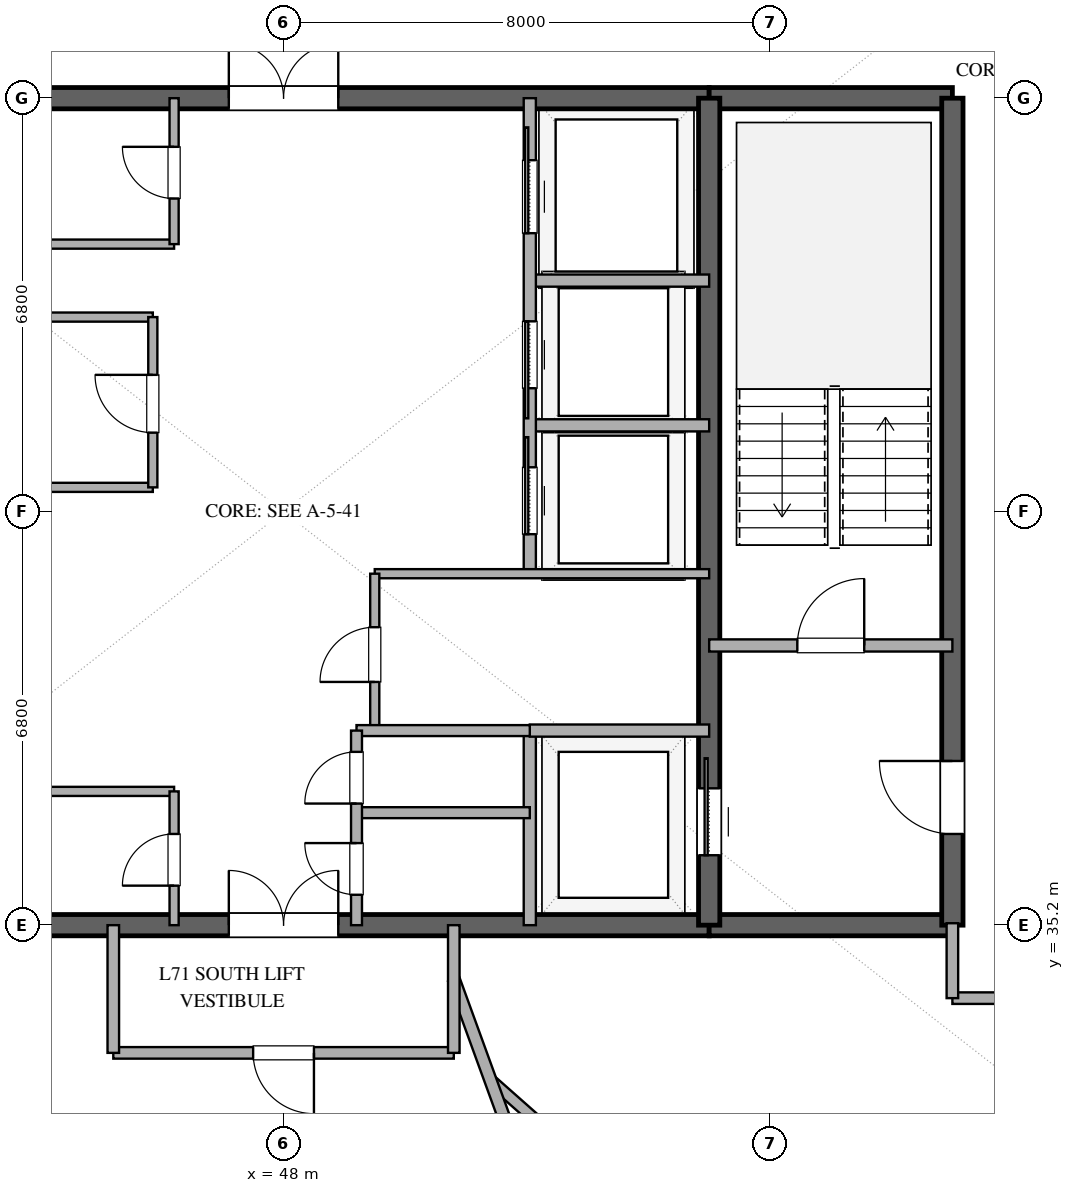
"""IFC4 building model, lengths in metres.
Left out: names, types, materials, properties, quantities, classifications, styles, units other than length and angle.
Written with IfcOpenShell. Run it as: python <this file> out.ifc"""

import sys

from ifc_helpers import new_model, si_unit, direction, frame, frame_2d, origin, place, context, subcontext, project, spatial, rectangle, extrude, element, fill, save


model = new_model("IFC4")
c1 = context("Model", 3, precision=1e-05, world=origin(), true_north=direction((0.0, 1.0)))
c2 = subcontext(c1, "Body", "Model", "MODEL_VIEW")
j1 = project(units=[si_unit("LENGTHUNIT", "METRE"), si_unit("PLANEANGLEUNIT", "RADIAN")], contexts=[c1])
p1 = place(None, origin())
s1 = spatial("IfcSite", under=j1, at=p1, CompositionType="ELEMENT")
p2 = place(p1, origin())
s2 = spatial("IfcBuilding", under=s1, at=p2, CompositionType="ELEMENT")
p3 = place(p2, frame((0.0, 0.0, 276.6)))
s3 = spatial("IfcBuildingStorey", under=s2, at=p3, CompositionType="ELEMENT", Elevation=276.6)
p4 = place(p3, frame((41.0, 35.2, 0.0), z_axis=(0.0, 0.0, 1.0), x_axis=(1.0, 0.0, 0.0)))
e1 = element("IfcWall", 1, at=p4, inside=s3, PredefinedType="SHEAR", context=c2, shape_type="SweptSolid", body=[
    extrude(rectangle(XDim=14.0, YDim=0.35, at=frame_2d((7.0, 0.0))), origin(), (0.0, 0.0, 1.0), 3.37),
])
p5 = place(p4, frame((6.1, 0.0, 0.0)))
e2 = element("IfcOpeningElement", 2, at=p5, cuts=e1, PredefinedType="OPENING", context=c2, shape_type="SweptSolid", body=[
    extrude(rectangle(XDim=1.8, YDim=2.25, at=frame_2d((0.9, 1.125))), frame((0.0, 0.185, 0.0), z_axis=(0.0, -1.0, 0.0), x_axis=(1.0, 0.0, 0.0)), (0.0, 0.0, 1.0), 0.37),
])
p6 = place(p3, frame((55.0, 35.2, 0.0), z_axis=(0.0, 0.0, 1.0), x_axis=(1.0, 0.0, 0.0)))
e3 = element("IfcWall", 3, at=p6, inside=s3, PredefinedType="SHEAR", context=c2, shape_type="SweptSolid", body=[
    extrude(rectangle(XDim=4.0, YDim=0.35, at=frame_2d((2.0, 0.0))), origin(), (0.0, 0.0, 1.0), 3.37),
])
p7 = place(p3, frame((41.0, 48.8, 0.0), z_axis=(0.0, 0.0, 1.0), x_axis=(1.0, 0.0, 0.0)))
e4 = element("IfcWall", 4, at=p7, inside=s3, PredefinedType="SHEAR", context=c2, shape_type="SweptSolid", body=[
    extrude(rectangle(XDim=14.0, YDim=0.35, at=frame_2d((7.0, 0.0))), origin(), (0.0, 0.0, 1.0), 3.37),
])
p8 = place(p7, frame((6.1, 0.0, 0.0)))
e5 = element("IfcOpeningElement", 5, at=p8, cuts=e4, PredefinedType="OPENING", context=c2, shape_type="SweptSolid", body=[
    extrude(rectangle(XDim=1.8, YDim=2.25, at=frame_2d((0.9, 1.125))), frame((0.0, 0.185, 0.0), z_axis=(0.0, -1.0, 0.0), x_axis=(1.0, 0.0, 0.0)), (0.0, 0.0, 1.0), 0.37),
])
p9 = place(p3, frame((55.0, 48.8, 0.0), z_axis=(0.0, 0.0, 1.0), x_axis=(1.0, 0.0, 0.0)))
e6 = element("IfcWall", 6, at=p9, inside=s3, PredefinedType="SHEAR", context=c2, shape_type="SweptSolid", body=[
    extrude(rectangle(XDim=4.0, YDim=0.35, at=frame_2d((2.0, 0.0))), origin(), (0.0, 0.0, 1.0), 3.37),
])
p10 = place(p3, frame((59.0, 35.2, 0.0), z_axis=(0.0, 0.0, 1.0), x_axis=(0.0, 1.0, 0.0)))
e7 = element("IfcWall", 7, at=p10, inside=s3, PredefinedType="SHEAR", context=c2, shape_type="SweptSolid", body=[
    extrude(rectangle(XDim=13.6, YDim=0.35, at=frame_2d((6.8, 0.0))), origin(), (0.0, 0.0, 1.0), 3.37),
])
p11 = place(p10, frame((1.5, 0.0, 0.0)))
e8 = element("IfcOpeningElement", 8, at=p11, cuts=e7, PredefinedType="OPENING", context=c2, shape_type="SweptSolid", body=[
    extrude(rectangle(XDim=1.2, YDim=2.15, at=frame_2d((0.6, 1.075))), frame((0.0, 0.185, 0.0), z_axis=(0.0, -1.0, 0.0), x_axis=(1.0, 0.0, 0.0)), (0.0, 0.0, 1.0), 0.37),
])
p12 = place(p3, frame((55.0, 35.2, 0.0), z_axis=(0.0, 0.0, 1.0), x_axis=(0.0, 1.0, 0.0)))
e9 = element("IfcWall", 9, at=p12, inside=s3, PredefinedType="SHEAR", context=c2, shape_type="SweptSolid", body=[
    extrude(rectangle(XDim=13.6, YDim=0.35, at=frame_2d((6.8, 0.0))), origin(), (0.0, 0.0, 1.0), 3.37),
])
p13 = place(p12, frame((1.15, 0.0, 0.0)))
e10 = element("IfcOpeningElement", 10, at=p13, cuts=e9, PredefinedType="OPENING", context=c2, shape_type="SweptSolid", body=[
    extrude(rectangle(XDim=1.1, YDim=2.2, at=frame_2d((0.55, 1.1))), frame((0.0, 0.185, 0.0), z_axis=(0.0, -1.0, 0.0), x_axis=(1.0, 0.0, 0.0)), (0.0, 0.0, 1.0), 0.37),
])
p14 = place(p3, frame((55.0, 39.8, 0.0), z_axis=(0.0, 0.0, 1.0), x_axis=(1.0, 0.0, 0.0)))
e11 = element("IfcWall", 11, at=p14, inside=s3, PredefinedType="SOLIDWALL", context=c2, shape_type="SweptSolid", body=[
    extrude(rectangle(XDim=4.0, YDim=0.2, at=frame_2d((2.0, 0.0))), origin(), (0.0, 0.0, 1.0), 2.73),
])
p15 = place(p14, frame((1.45, 0.0, 0.0)))
e12 = element("IfcOpeningElement", 12, at=p15, cuts=e11, PredefinedType="OPENING", context=c2, shape_type="SweptSolid", body=[
    extrude(rectangle(XDim=1.1, YDim=2.15, at=frame_2d((0.55, 1.075))), frame((0.0, 0.11, 0.0), z_axis=(0.0, -1.0, 0.0), x_axis=(1.0, 0.0, 0.0)), (0.0, 0.0, 1.0), 0.22),
])
p16 = place(p3, frame((52.05, 35.2, 0.0), z_axis=(0.0, 0.0, 1.0), x_axis=(0.0, 1.0, 0.0)))
e13 = element("IfcWall", 13, at=p16, inside=s3, PredefinedType="SOLIDWALL", context=c2, shape_type="SweptSolid", body=[
    extrude(rectangle(XDim=3.2, YDim=0.2, at=frame_2d((1.6, 0.0))), origin(), (0.0, 0.0, 1.0), 2.73),
])
p17 = place(p3, frame((52.05, 38.4, 0.0), z_axis=(0.0, 0.0, 1.0), x_axis=(1.0, 0.0, 0.0)))
e14 = element("IfcWall", 14, at=p17, inside=s3, PredefinedType="SOLIDWALL", context=c2, shape_type="SweptSolid", body=[
    extrude(rectangle(XDim=2.95, YDim=0.2, at=frame_2d((1.475, 0.0))), origin(), (0.0, 0.0, 1.0), 2.73),
])
for number, where, z_axis, x_axis in (
    (15, (41.0, 42.4, 0.0), (0.0, 0.0, 1.0), (1.0, 0.0, 0.0)),
    (16, (41.0, 45.2, 0.0), (0.0, 0.0, 1.0), (1.0, 0.0, 0.0)),
):
    element("IfcWall", number, at=place(p3, frame(where, z_axis=z_axis, x_axis=x_axis)), inside=s3, PredefinedType="PARTITIONING", context=c2, shape_type="SweptSolid", body=[
        extrude(rectangle(XDim=4.85, YDim=0.15, at=frame_2d((2.425, 0.0))), origin(), (0.0, 0.0, 1.0), 2.73),
    ])
p18 = place(p3, frame((45.85, 42.4, 0.0), z_axis=(0.0, 0.0, 1.0), x_axis=(0.0, 1.0, 0.0)))
e17 = element("IfcWall", 17, at=p18, inside=s3, PredefinedType="PARTITIONING", context=c2, shape_type="SweptSolid", body=[
    extrude(rectangle(XDim=2.8, YDim=0.15, at=frame_2d((1.4, 0.0))), origin(), (0.0, 0.0, 1.0), 2.73),
])
p19 = place(p18, frame((0.9, 0.0, 0.0)))
e18 = element("IfcOpeningElement", 18, at=p19, cuts=e17, PredefinedType="OPENING", context=c2, shape_type="SweptSolid", body=[
    extrude(rectangle(XDim=0.95, YDim=2.15, at=frame_2d((0.475, 1.075))), frame((0.0, 0.085, 0.0), z_axis=(0.0, -1.0, 0.0), x_axis=(1.0, 0.0, 0.0)), (0.0, 0.0, 1.0), 0.17),
])
for number, where, z_axis, x_axis in (
    (19, (52.05, 43.42, 0.0), (0.0, 0.0, 1.0), (1.0, 0.0, 0.0)),
    (20, (52.05, 45.8, 0.0), (0.0, 0.0, 1.0), (1.0, 0.0, 0.0)),
):
    element("IfcWall", number, at=place(p3, frame(where, z_axis=z_axis, x_axis=x_axis)), inside=s3, PredefinedType="SOLIDWALL", context=c2, shape_type="SweptSolid", body=[
        extrude(rectangle(XDim=2.95, YDim=0.2, at=frame_2d((1.475, 0.0))), origin(), (0.0, 0.0, 1.0), 2.73),
    ])
p20 = place(p3, frame((52.05, 40.98, 0.0), z_axis=(0.0, 0.0, 1.0), x_axis=(0.0, 1.0, 0.0)))
e21 = element("IfcWall", 21, at=p20, inside=s3, PredefinedType="SOLIDWALL", context=c2, shape_type="SweptSolid", body=[
    extrude(rectangle(XDim=7.82, YDim=0.2, at=frame_2d((3.91, 0.0))), origin(), (0.0, 0.0, 1.0), 2.73),
])
p21 = place(p20, frame((0.65, 0.0, 0.0)))
e22 = element("IfcOpeningElement", 22, at=p21, cuts=e21, PredefinedType="OPENING", context=c2, shape_type="SweptSolid", body=[
    extrude(rectangle(XDim=1.1, YDim=2.2, at=frame_2d((0.55, 1.1))), frame((0.0, 0.11, 0.0), z_axis=(0.0, -1.0, 0.0), x_axis=(1.0, 0.0, 0.0)), (0.0, 0.0, 1.0), 0.22),
])
p22 = place(p20, frame((3.05, 0.0, 0.0)))
e23 = element("IfcOpeningElement", 23, at=p22, cuts=e21, PredefinedType="OPENING", context=c2, shape_type="SweptSolid", body=[
    extrude(rectangle(XDim=1.1, YDim=2.2, at=frame_2d((0.55, 1.1))), frame((0.0, 0.11, 0.0), z_axis=(0.0, -1.0, 0.0), x_axis=(1.0, 0.0, 0.0)), (0.0, 0.0, 1.0), 0.22),
])
p23 = place(p20, frame((5.6, 0.0, 0.0)))
e24 = element("IfcOpeningElement", 24, at=p23, cuts=e21, PredefinedType="OPENING", context=c2, shape_type="SweptSolid", body=[
    extrude(rectangle(XDim=1.2, YDim=2.2, at=frame_2d((0.6, 1.1))), frame((0.0, 0.11, 0.0), z_axis=(0.0, -1.0, 0.0), x_axis=(1.0, 0.0, 0.0)), (0.0, 0.0, 1.0), 0.22),
])
p24 = place(p3, frame((49.5, 40.98, 0.0), z_axis=(0.0, 0.0, 1.0), x_axis=(1.0, 0.0, 0.0)))
e25 = element("IfcWall", 25, at=p24, inside=s3, PredefinedType="PARTITIONING", context=c2, shape_type="SweptSolid", body=[
    extrude(rectangle(XDim=5.5, YDim=0.15, at=frame_2d((2.75, 0.0))), origin(), (0.0, 0.0, 1.0), 2.73),
])
p25 = place(p3, frame((49.5, 38.4, 0.0), z_axis=(0.0, 0.0, 1.0), x_axis=(0.0, 1.0, 0.0)))
e26 = element("IfcWall", 26, at=p25, inside=s3, PredefinedType="PARTITIONING", context=c2, shape_type="SweptSolid", body=[
    extrude(rectangle(XDim=2.58, YDim=0.15, at=frame_2d((1.29, 0.0))), origin(), (0.0, 0.0, 1.0), 2.73),
])
p26 = place(p25, frame((0.8, 0.0, 0.0)))
e27 = element("IfcOpeningElement", 27, at=p26, cuts=e26, PredefinedType="OPENING", context=c2, shape_type="SweptSolid", body=[
    extrude(rectangle(XDim=0.9, YDim=2.15, at=frame_2d((0.45, 1.075))), frame((0.0, 0.085, 0.0), z_axis=(0.0, -1.0, 0.0), x_axis=(1.0, 0.0, 0.0)), (0.0, 0.0, 1.0), 0.17),
])
p27 = place(p3, frame((43.95, 37.4, 0.0), z_axis=(0.0, 0.0, 1.0), x_axis=(1.0, 0.0, 0.0)))
e28 = element("IfcWall", 28, at=p27, inside=s3, PredefinedType="PARTITIONING", context=c2, shape_type="SweptSolid", body=[
    extrude(rectangle(XDim=2.25, YDim=0.15, at=frame_2d((1.125, 0.0))), origin(), (0.0, 0.0, 1.0), 2.73),
])
p28 = place(p3, frame((46.2, 35.2, 0.0), z_axis=(0.0, 0.0, 1.0), x_axis=(0.0, 1.0, 0.0)))
e29 = element("IfcWall", 29, at=p28, inside=s3, PredefinedType="PARTITIONING", context=c2, shape_type="SweptSolid", body=[
    extrude(rectangle(XDim=2.2, YDim=0.15, at=frame_2d((1.1, 0.0))), origin(), (0.0, 0.0, 1.0), 2.73),
])
p29 = place(p28, frame((0.65, 0.0, 0.0)))
e30 = element("IfcOpeningElement", 30, at=p29, cuts=e29, PredefinedType="OPENING", context=c2, shape_type="SweptSolid", body=[
    extrude(rectangle(XDim=0.85, YDim=2.15, at=frame_2d((0.425, 1.075))), frame((0.0, 0.085, 0.0), z_axis=(0.0, -1.0, 0.0), x_axis=(1.0, 0.0, 0.0)), (0.0, 0.0, 1.0), 0.17),
])
p30 = place(p3, frame((43.95, 46.4, 0.0), z_axis=(0.0, 0.0, 1.0), x_axis=(1.0, 0.0, 0.0)))
e31 = element("IfcWall", 31, at=p30, inside=s3, PredefinedType="PARTITIONING", context=c2, shape_type="SweptSolid", body=[
    extrude(rectangle(XDim=2.25, YDim=0.15, at=frame_2d((1.125, 0.0))), origin(), (0.0, 0.0, 1.0), 2.73),
])
p31 = place(p3, frame((46.2, 46.4, 0.0), z_axis=(0.0, 0.0, 1.0), x_axis=(0.0, 1.0, 0.0)))
e32 = element("IfcWall", 32, at=p31, inside=s3, PredefinedType="PARTITIONING", context=c2, shape_type="SweptSolid", body=[
    extrude(rectangle(XDim=2.4, YDim=0.15, at=frame_2d((1.2, 0.0))), origin(), (0.0, 0.0, 1.0), 2.73),
])
p32 = place(p31, frame((0.75, 0.0, 0.0)))
e33 = element("IfcOpeningElement", 33, at=p32, cuts=e32, PredefinedType="OPENING", context=c2, shape_type="SweptSolid", body=[
    extrude(rectangle(XDim=0.85, YDim=2.15, at=frame_2d((0.425, 1.075))), frame((0.0, 0.085, 0.0), z_axis=(0.0, -1.0, 0.0), x_axis=(1.0, 0.0, 0.0)), (0.0, 0.0, 1.0), 0.17),
])
for number, where, z_axis, x_axis in (
    (34, (49.2, 37.05, 0.0), (0.0, 0.0, 1.0), (1.0, 0.0, 0.0)),
    (35, (49.2, 38.4, 0.0), (0.0, 0.0, 1.0), (1.0, 0.0, 0.0)),
):
    element("IfcWall", number, at=place(p3, frame(where, z_axis=z_axis, x_axis=x_axis)), inside=s3, PredefinedType="PLUMBINGWALL", context=c2, shape_type="SweptSolid", body=[
        extrude(rectangle(XDim=2.85, YDim=0.18, at=frame_2d((1.425, 0.0))), origin(), (0.0, 0.0, 1.0), 2.73),
    ])
p33 = place(p3, frame((49.2, 35.2, 0.0), z_axis=(0.0, 0.0, 1.0), x_axis=(0.0, 1.0, 0.0)))
e36 = element("IfcWall", 36, at=p33, inside=s3, PredefinedType="PLUMBINGWALL", context=c2, shape_type="SweptSolid", body=[
    extrude(rectangle(XDim=3.2, YDim=0.18, at=frame_2d((1.6, 0.0))), origin(), (0.0, 0.0, 1.0), 2.73),
])
p34 = place(p33, frame((0.5, 0.0, 0.0)))
e37 = element("IfcOpeningElement", 37, at=p34, cuts=e36, PredefinedType="OPENING", context=c2, shape_type="SweptSolid", body=[
    extrude(rectangle(XDim=0.85, YDim=2.1, at=frame_2d((0.425, 1.05))), frame((0.0, 0.1, 0.0), z_axis=(0.0, -1.0, 0.0), x_axis=(1.0, 0.0, 0.0)), (0.0, 0.0, 1.0), 0.2),
])
p35 = place(p33, frame((2.0, 0.0, 0.0)))
e38 = element("IfcOpeningElement", 38, at=p35, cuts=e36, PredefinedType="OPENING", context=c2, shape_type="SweptSolid", body=[
    extrude(rectangle(XDim=0.85, YDim=2.15, at=frame_2d((0.425, 1.075))), frame((0.0, 0.1, 0.0), z_axis=(0.0, -1.0, 0.0), x_axis=(1.0, 0.0, 0.0)), (0.0, 0.0, 1.0), 0.2),
])
p36 = place(p3, frame((56.389, 28.246, 0.0), z_axis=(0.0, 0.0, 1.0), x_axis=(-0.749087509224, 0.662471058632, 0.0)))
e39 = element("IfcWall", 39, at=p36, inside=s3, PredefinedType="PLUMBINGWALL", context=c2, shape_type="SweptSolid", body=[
    extrude(rectangle(XDim=6.66, YDim=0.18, at=frame_2d((3.33, 0.0))), origin(), (0.0, 0.0, 1.0), 2.73),
])
p37 = place(p36, frame((2.905, 0.0, 0.0)))
e40 = element("IfcOpeningElement", 40, at=p37, cuts=e39, PredefinedType="OPENING", context=c2, shape_type="SweptSolid", body=[
    extrude(rectangle(XDim=0.85, YDim=2.1, at=frame_2d((0.425, 1.05))), frame((0.0, 0.1, 0.0), z_axis=(0.0, -1.0, 0.0), x_axis=(1.0, 0.0, 0.0)), (0.0, 0.0, 1.0), 0.2),
])
p38 = place(p3, frame((50.8, 33.1, 0.0), z_axis=(0.0, 0.0, 1.0), x_axis=(-1.0, 0.0, 0.0)))
e41 = element("IfcWall", 41, at=p38, inside=s3, PredefinedType="PARTITIONING", context=c2, shape_type="SweptSolid", body=[
    extrude(rectangle(XDim=5.6, YDim=0.19, at=frame_2d((2.8, 0.0))), origin(), (0.0, 0.0, 1.0), 2.73),
])
p39 = place(p38, frame((2.3, 0.0, 0.0)))
e42 = element("IfcOpeningElement", 42, at=p39, cuts=e41, PredefinedType="OPENING", context=c2, shape_type="SweptSolid", body=[
    extrude(rectangle(XDim=1.0, YDim=2.2, at=frame_2d((0.5, 1.1))), frame((0.0, 0.105, 0.0), z_axis=(0.0, -1.0, 0.0), x_axis=(1.0, 0.0, 0.0)), (0.0, 0.0, 1.0), 0.21),
])
p40 = place(p3, frame((50.8, 34.307, 0.0), z_axis=(0.0, 0.0, 1.0), x_axis=(0.342010724278, -0.939696048985, 0.0)))
e43 = element("IfcWall", 43, at=p40, inside=s3, PredefinedType="PARTITIONING", context=c2, shape_type="SweptSolid", body=[
    extrude(rectangle(XDim=8.568, YDim=0.2, at=frame_2d((4.284, 0.0))), origin(), (0.0, 0.0, 1.0), 2.73),
])
p41 = place(p3, frame((61.2, 34.0, 0.0), z_axis=(0.0, 0.0, 1.0), x_axis=(-1.0, 0.0, 0.0)))
e44 = element("IfcWall", 44, at=p41, inside=s3, PredefinedType="PARTITIONING", context=c2, shape_type="SweptSolid", body=[
    extrude(rectangle(XDim=2.2, YDim=0.19, at=frame_2d((1.1, 0.0))), origin(), (0.0, 0.0, 1.0), 2.73),
])
for number, where, z_axis, x_axis in (
    (45, (45.2, 33.1, 0.0), (0.0, 0.0, 1.0), (0.0, 1.0, 0.0)),
    (46, (50.8, 35.2, 0.0), (0.0, 0.0, 1.0), (0.0, -1.0, 0.0)),
):
    element("IfcWall", number, at=place(p3, frame(where, z_axis=z_axis, x_axis=x_axis)), inside=s3, PredefinedType="PARTITIONING", context=c2, shape_type="SweptSolid", body=[
        extrude(rectangle(XDim=2.1, YDim=0.19, at=frame_2d((1.05, 0.0))), origin(), (0.0, 0.0, 1.0), 2.73),
    ])
p42 = place(p3, frame((59.0, 34.0, 0.0), z_axis=(0.0, 0.0, 1.0), x_axis=(0.0, 1.0, 0.0)))
e47 = element("IfcWall", 47, at=p42, inside=s3, PredefinedType="PARTITIONING", context=c2, shape_type="SweptSolid", body=[
    extrude(rectangle(XDim=1.232, YDim=0.19, at=frame_2d((0.616, 0.0))), origin(), (0.0, 0.0, 1.0), 2.73),
])
p43 = place(p13, origin())
e48 = element("IfcDoor", 48, at=p43, inside=s3, OperationType="SLIDING_TO_RIGHT", PredefinedType="DOOR", context=c2, shape_type="SweptSolid", body=[
    extrude(rectangle(XDim=1.1, YDim=2.2, at=frame_2d((0.55, 1.1))), frame((0.0, 0.025, 0.0), z_axis=(0.0, -1.0, 0.0), x_axis=(1.0, 0.0, 0.0)), (0.0, 0.0, 1.0), 0.05),
])
fill(e10, e48)
p44 = place(p11, origin())
e49 = element("IfcDoor", 49, at=p44, inside=s3, OperationType="SINGLE_SWING_RIGHT", PredefinedType="DOOR", context=c2, shape_type="SweptSolid", body=[
    extrude(rectangle(XDim=1.2, YDim=2.15, at=frame_2d((0.6, 1.075))), frame((0.0, 0.025, 0.0), z_axis=(0.0, -1.0, 0.0), x_axis=(1.0, 0.0, 0.0)), (0.0, 0.0, 1.0), 0.05),
])
fill(e8, e49)
p45 = place(p5, origin())
e50 = element("IfcDoor", 50, at=p45, inside=s3, OperationType="DOUBLE_DOOR_SINGLE_SWING", PredefinedType="DOOR", context=c2, shape_type="SweptSolid", body=[
    extrude(rectangle(XDim=1.8, YDim=2.25, at=frame_2d((0.9, 1.125))), frame((0.0, 0.025, 0.0), z_axis=(0.0, -1.0, 0.0), x_axis=(1.0, 0.0, 0.0)), (0.0, 0.0, 1.0), 0.05),
])
fill(e2, e50)
p46 = place(p8, origin())
e51 = element("IfcDoor", 51, at=p46, inside=s3, OperationType="DOUBLE_DOOR_SINGLE_SWING", PredefinedType="DOOR", context=c2, shape_type="SweptSolid", body=[
    extrude(rectangle(XDim=1.8, YDim=2.25, at=frame_2d((0.9, 1.125))), frame((0.0, 0.025, 0.0), z_axis=(0.0, -1.0, 0.0), x_axis=(1.0, 0.0, 0.0)), (0.0, 0.0, 1.0), 0.05),
])
fill(e5, e51)
p47 = place(p15, origin())
e52 = element("IfcDoor", 52, at=p47, inside=s3, OperationType="SINGLE_SWING_RIGHT", PredefinedType="DOOR", context=c2, shape_type="SweptSolid", body=[
    extrude(rectangle(XDim=1.1, YDim=2.15, at=frame_2d((0.55, 1.075))), frame((0.0, 0.025, 0.0), z_axis=(0.0, -1.0, 0.0), x_axis=(1.0, 0.0, 0.0)), (0.0, 0.0, 1.0), 0.05),
])
fill(e12, e52)
p48 = place(p19, origin())
e53 = element("IfcDoor", 53, at=p48, inside=s3, OperationType="SINGLE_SWING_RIGHT", PredefinedType="DOOR", context=c2, shape_type="SweptSolid", body=[
    extrude(rectangle(XDim=0.95, YDim=2.15, at=frame_2d((0.475, 1.075))), frame((0.0, 0.025, 0.0), z_axis=(0.0, -1.0, 0.0), x_axis=(1.0, 0.0, 0.0)), (0.0, 0.0, 1.0), 0.05),
])
fill(e18, e53)
p49 = place(p21, origin())
e54 = element("IfcDoor", 54, at=p49, inside=s3, OperationType="SLIDING_TO_RIGHT", PredefinedType="DOOR", context=c2, shape_type="SweptSolid", body=[
    extrude(rectangle(XDim=1.1, YDim=2.2, at=frame_2d((0.55, 1.1))), frame((0.0, 0.025, 0.0), z_axis=(0.0, -1.0, 0.0), x_axis=(1.0, 0.0, 0.0)), (0.0, 0.0, 1.0), 0.05),
])
fill(e22, e54)
p50 = place(p22, origin())
e55 = element("IfcDoor", 55, at=p50, inside=s3, OperationType="SLIDING_TO_LEFT", PredefinedType="DOOR", context=c2, shape_type="SweptSolid", body=[
    extrude(rectangle(XDim=1.1, YDim=2.2, at=frame_2d((0.55, 1.1))), frame((0.0, 0.025, 0.0), z_axis=(0.0, -1.0, 0.0), x_axis=(1.0, 0.0, 0.0)), (0.0, 0.0, 1.0), 0.05),
])
fill(e23, e55)
p51 = place(p23, origin())
e56 = element("IfcDoor", 56, at=p51, inside=s3, OperationType="SLIDING_TO_RIGHT", PredefinedType="DOOR", context=c2, shape_type="SweptSolid", body=[
    extrude(rectangle(XDim=1.2, YDim=2.2, at=frame_2d((0.6, 1.1))), frame((0.0, 0.025, 0.0), z_axis=(0.0, -1.0, 0.0), x_axis=(1.0, 0.0, 0.0)), (0.0, 0.0, 1.0), 0.05),
])
fill(e24, e56)
p52 = place(p26, origin())
e57 = element("IfcDoor", 57, at=p52, inside=s3, OperationType="SINGLE_SWING_LEFT", PredefinedType="DOOR", context=c2, shape_type="SweptSolid", body=[
    extrude(rectangle(XDim=0.9, YDim=2.15, at=frame_2d((0.45, 1.075))), frame((0.0, 0.025, 0.0), z_axis=(0.0, -1.0, 0.0), x_axis=(1.0, 0.0, 0.0)), (0.0, 0.0, 1.0), 0.05),
])
fill(e27, e57)
p53 = place(p29, origin())
e58 = element("IfcDoor", 58, at=p53, inside=s3, OperationType="SINGLE_SWING_LEFT", PredefinedType="DOOR", context=c2, shape_type="SweptSolid", body=[
    extrude(rectangle(XDim=0.85, YDim=2.15, at=frame_2d((0.425, 1.075))), frame((0.0, 0.025, 0.0), z_axis=(0.0, -1.0, 0.0), x_axis=(1.0, 0.0, 0.0)), (0.0, 0.0, 1.0), 0.05),
])
fill(e30, e58)
p54 = place(p32, origin())
e59 = element("IfcDoor", 59, at=p54, inside=s3, OperationType="SINGLE_SWING_RIGHT", PredefinedType="DOOR", context=c2, shape_type="SweptSolid", body=[
    extrude(rectangle(XDim=0.85, YDim=2.15, at=frame_2d((0.425, 1.075))), frame((0.0, 0.025, 0.0), z_axis=(0.0, -1.0, 0.0), x_axis=(1.0, 0.0, 0.0)), (0.0, 0.0, 1.0), 0.05),
])
fill(e33, e59)
p55 = place(p34, origin())
e60 = element("IfcDoor", 60, at=p55, inside=s3, OperationType="SINGLE_SWING_RIGHT", PredefinedType="DOOR", context=c2, shape_type="SweptSolid", body=[
    extrude(rectangle(XDim=0.85, YDim=2.1, at=frame_2d((0.425, 1.05))), frame((0.0, 0.025, 0.0), z_axis=(0.0, -1.0, 0.0), x_axis=(1.0, 0.0, 0.0)), (0.0, 0.0, 1.0), 0.05),
])
fill(e37, e60)
p56 = place(p35, origin())
e61 = element("IfcDoor", 61, at=p56, inside=s3, OperationType="SINGLE_SWING_LEFT", PredefinedType="DOOR", context=c2, shape_type="SweptSolid", body=[
    extrude(rectangle(XDim=0.85, YDim=2.15, at=frame_2d((0.425, 1.075))), frame((0.0, 0.025, 0.0), z_axis=(0.0, -1.0, 0.0), x_axis=(1.0, 0.0, 0.0)), (0.0, 0.0, 1.0), 0.05),
])
fill(e38, e61)
p57 = place(p39, origin())
e62 = element("IfcDoor", 62, at=p57, inside=s3, OperationType="SINGLE_SWING_LEFT", PredefinedType="DOOR", context=c2, shape_type="SweptSolid", body=[
    extrude(rectangle(XDim=1.0, YDim=2.2, at=frame_2d((0.5, 1.1))), frame((0.0, 0.025, 0.0), z_axis=(0.0, -1.0, 0.0), x_axis=(1.0, 0.0, 0.0)), (0.0, 0.0, 1.0), 0.05),
])
fill(e42, e62)
save(model, sys.argv[1])
